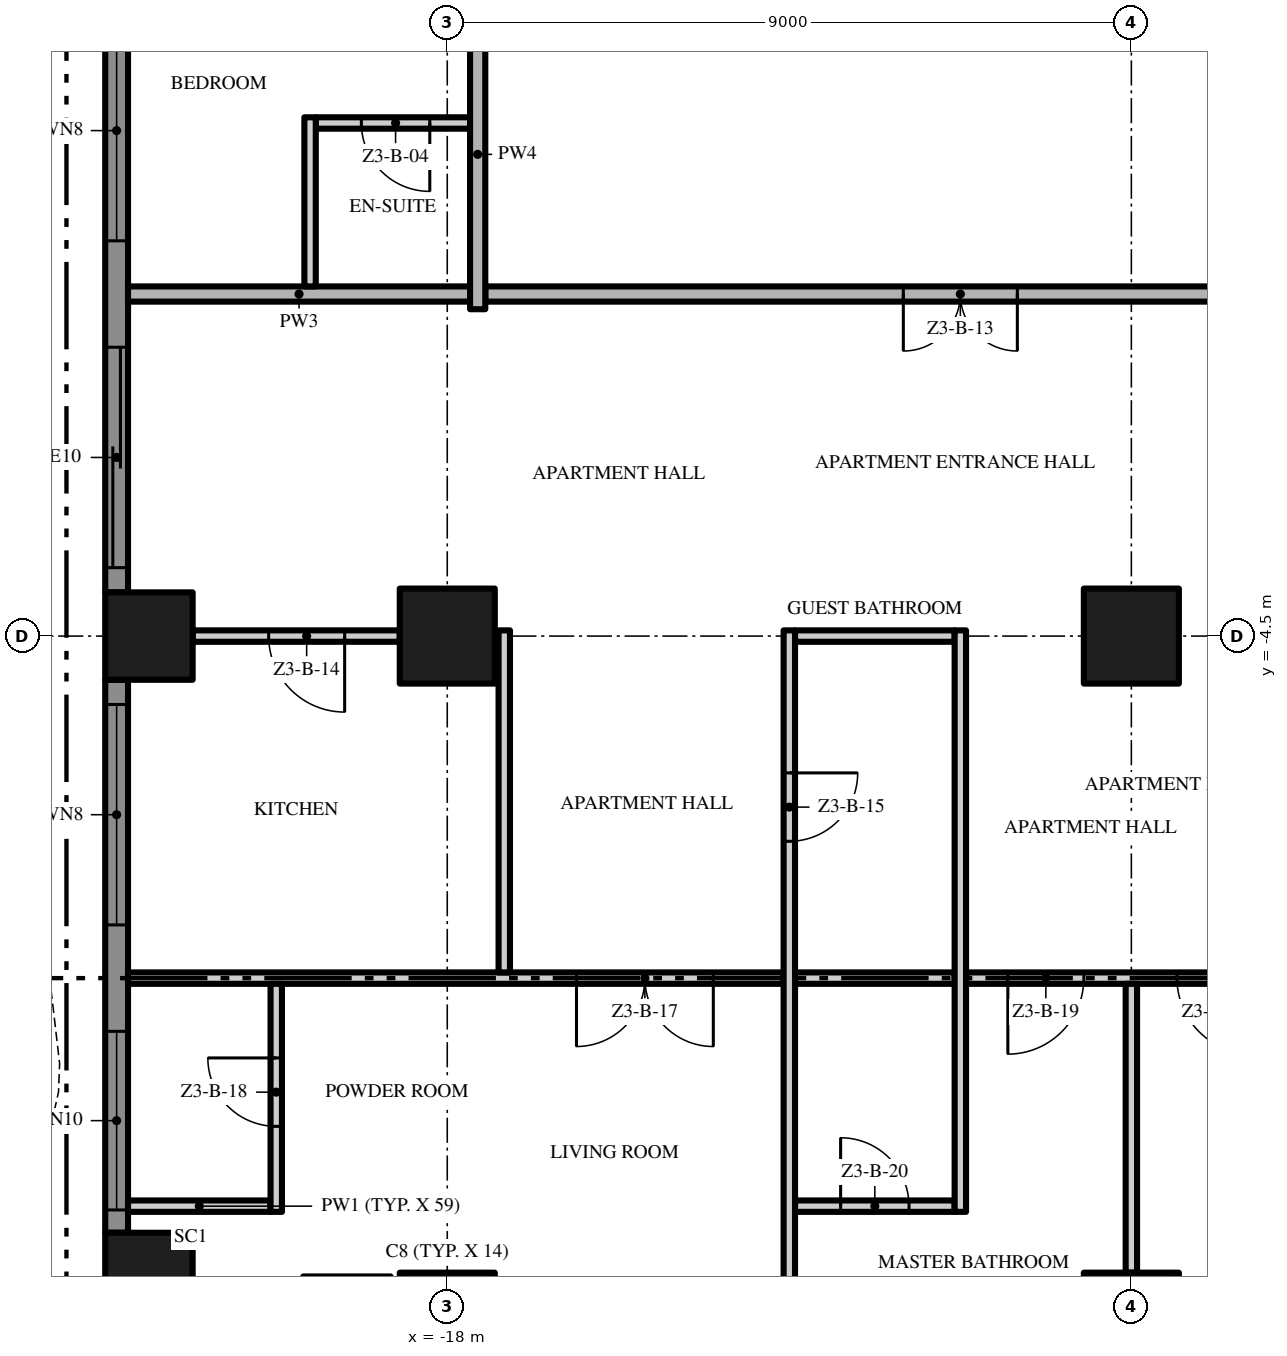
"""IFC4 building model, lengths in metres.
Left out: names, types, materials, properties, quantities, classifications, styles, units other than length and angle.
Written with IfcOpenShell. Run it as: python <this file> out.ifc"""

import sys

from ifc_helpers import new_model, si_unit, direction, frame, frame_2d, origin, origin_2d, place, context, subcontext, project, spatial, polyline, rectangle, outline, extrude, element, fill, save


model = new_model("IFC4")
c1 = context("Model", 3, precision=1e-05, world=origin(), true_north=direction((0.0, 1.0)))
c2 = subcontext(c1, "Body", "Model", "MODEL_VIEW")
j1 = project(units=[si_unit("LENGTHUNIT", "METRE"), si_unit("PLANEANGLEUNIT", "RADIAN")], contexts=[c1])
p1 = place(None, origin())
s1 = spatial("IfcSite", under=j1, at=p1, CompositionType="ELEMENT")
p2 = place(p1, origin())
s2 = spatial("IfcBuilding", under=s1, at=p2, CompositionType="ELEMENT")
p3 = place(p2, frame((0.0, 0.0, 140.2)))
s3 = spatial("IfcBuildingStorey", under=s2, at=p3, CompositionType="ELEMENT", Elevation=140.2)
for number, where, z_axis, x_axis in (
    (1, (-18.0, -13.5, 0.0), (0.0, 0.0, 1.0), (1.0, 0.0, 0.0)),
    (2, (-18.0, -4.5, 0.0), (0.0, 0.0, 1.0), (1.0, 0.0, 0.0)),
):
    element("IfcColumn", number, at=place(p3, frame(where, z_axis=z_axis, x_axis=x_axis)), inside=s3, PredefinedType="COLUMN", context=c2, shape_type="SweptSolid", body=[
        extrude(rectangle(XDim=1.25, YDim=1.25, at=origin_2d()), origin(), (0.0, 0.0, 1.0), 3.5),
    ])
for number, where, z_axis, x_axis in (
    (3, (-21.925, -12.925, 0.0), (0.0, 0.0, 1.0), (1.0, 0.0, 0.0)),
    (4, (-21.925, -4.5, 0.0), (0.0, 0.0, 1.0), (1.0, 0.0, 0.0)),
):
    element("IfcColumn", number, at=place(p3, frame(where, z_axis=z_axis, x_axis=x_axis)), inside=s3, PredefinedType="COLUMN", context=c2, shape_type="SweptSolid", body=[
        extrude(rectangle(XDim=1.15, YDim=1.15, at=origin_2d()), origin(), (0.0, 0.0, 1.0), 3.5),
    ])
for number, where, z_axis, x_axis in (
    (5, (-9.0, -13.5, 0.0), (0.0, 0.0, 1.0), (1.0, 0.0, 0.0)),
    (6, (-9.0, -4.5, 0.0), (0.0, 0.0, 1.0), (1.0, 0.0, 0.0)),
):
    element("IfcColumn", number, at=place(p3, frame(where, z_axis=z_axis, x_axis=x_axis)), inside=s3, PredefinedType="COLUMN", context=c2, shape_type="SweptSolid", body=[
        extrude(rectangle(XDim=1.25, YDim=1.25, at=origin_2d()), origin(), (0.0, 0.0, 1.0), 3.5),
    ])
p4 = place(p3, frame((-22.35, -3.925, 0.0), z_axis=(0.0, 0.0, 1.0), x_axis=(0.0, 1.0, 0.0)))
e7 = element("IfcWall", 7, at=p4, inside=s3, PredefinedType="SOLIDWALL", context=c2, shape_type="SweptSolid", body=[
    extrude(rectangle(XDim=7.85, YDim=0.3, at=frame_2d((3.925, 0.0))), origin(), (0.0, 0.0, 1.0), 3.5),
])
p5 = place(p4, frame((4.625, 0.0, 0.45)))
e8 = element("IfcOpeningElement", 8, at=p5, cuts=e7, PredefinedType="OPENING", context=c2, shape_type="SweptSolid", body=[
    extrude(rectangle(XDim=2.9, YDim=2.65, at=frame_2d((1.45, 1.325))), frame((0.0, 0.16, 0.0), z_axis=(0.0, -1.0, 0.0), x_axis=(1.0, 0.0, 0.0)), (0.0, 0.0, 1.0), 0.32),
])
p6 = place(p4, frame((0.325, 0.0, 0.0)))
e9 = element("IfcOpeningElement", 9, at=p6, cuts=e7, PredefinedType="OPENING", context=c2, shape_type="SweptSolid", body=[
    extrude(rectangle(XDim=2.9, YDim=2.4, at=frame_2d((1.45, 1.2))), frame((0.0, 0.16, 0.0), z_axis=(0.0, -1.0, 0.0), x_axis=(1.0, 0.0, 0.0)), (0.0, 0.0, 1.0), 0.32),
])
p7 = place(p3, frame((-22.35, -12.35, 0.0), z_axis=(0.0, 0.0, 1.0), x_axis=(0.0, 1.0, 0.0)))
e10 = element("IfcWall", 10, at=p7, inside=s3, PredefinedType="SOLIDWALL", context=c2, shape_type="SweptSolid", body=[
    extrude(rectangle(XDim=7.275, YDim=0.3, at=frame_2d((3.638, 0.0))), origin(), (0.0, 0.0, 1.0), 3.5),
])
p8 = place(p7, frame((4.05, 0.0, 0.45)))
e11 = element("IfcOpeningElement", 11, at=p8, cuts=e10, PredefinedType="OPENING", context=c2, shape_type="SweptSolid", body=[
    extrude(rectangle(XDim=2.9, YDim=2.65, at=frame_2d((1.45, 1.325))), frame((0.0, 0.16, 0.0), z_axis=(0.0, -1.0, 0.0), x_axis=(1.0, 0.0, 0.0)), (0.0, 0.0, 1.0), 0.32),
])
p9 = place(p7, frame((0.3, 0.0, 0.45)))
e12 = element("IfcOpeningElement", 12, at=p9, cuts=e10, PredefinedType="OPENING", context=c2, shape_type="SweptSolid", body=[
    extrude(rectangle(XDim=2.35, YDim=2.65, at=frame_2d((1.175, 1.325))), frame((0.0, 0.16, 0.0), z_axis=(0.0, -1.0, 0.0), x_axis=(1.0, 0.0, 0.0)), (0.0, 0.0, 1.0), 0.32),
])
p10 = place(p3, origin())
e13 = element("IfcWall", 13, at=p10, inside=s3, PredefinedType="USERDEFINED", context=c2, shape_type="SweptSolid", body=[
    extrude(outline(polyline([(-23.451, 18.0), (-24.112, 16.5), (-24.845, 15.0), (-25.369, 13.5), (-25.5, 12.375), (-25.485, 12.0), (-25.149, 10.5), (-24.488, 9.0), (-23.755, 7.5), (-23.231, 6.0), (-23.1, 4.875), (-23.115, 4.5), (-23.451, 3.0), (-24.112, 1.5), (-24.845, 0.0), (-25.369, -1.5), (-25.5, -2.625), (-25.485, -3.0), (-25.149, -4.5), (-24.488, -6.0), (-23.755, -7.5), (-23.231, -9.0), (-23.1, -10.125), (-23.115, -10.5), (-23.451, -12.0), (-24.112, -13.5), (-23.883, -13.601), (-23.213, -12.079), (-22.866, -10.533), (-22.849, -10.115), (-22.986, -8.944), (-23.524, -7.404), (-24.261, -5.895), (-24.91, -4.421), (-25.236, -2.967), (-25.249, -2.635), (-25.124, -1.556), (-24.614, -0.096), (-23.885, 1.395), (-23.213, 2.921), (-22.866, 4.467), (-22.849, 4.885), (-22.986, 6.056), (-23.524, 7.596), (-24.261, 9.105), (-24.91, 10.579), (-25.236, 12.033), (-25.249, 12.365), (-25.124, 13.444), (-24.614, 14.904), (-23.885, 16.395), (-23.223, 17.899), (-23.451, 18.0)])), origin(), (0.0, 0.0, 1.0), 0.9),
])
p11 = place(p3, frame((-22.2, -12.0, 0.0), z_axis=(0.0, 0.0, 1.0), x_axis=(1.0, 0.0, 0.0)))
e14 = element("IfcWall", 14, at=p11, inside=s3, PredefinedType="PARTITIONING", context=c2, shape_type="SweptSolid", body=[
    extrude(rectangle(XDim=1.875, YDim=0.15, at=frame_2d((0.938, 0.0))), origin(), (0.0, 0.0, 1.0), 3.5),
])
p12 = place(p3, frame((-13.425, -12.0, 0.0), z_axis=(0.0, 0.0, 1.0), x_axis=(1.0, 0.0, 0.0)))
e15 = element("IfcWall", 15, at=p12, inside=s3, PredefinedType="PARTITIONING", context=c2, shape_type="SweptSolid", body=[
    extrude(rectangle(XDim=2.1, YDim=0.15, at=frame_2d((1.05, 0.0))), origin(), (0.0, 0.0, 1.0), 3.5),
])
p13 = place(p12, frame((0.6, 0.0, 0.0)))
e16 = element("IfcOpeningElement", 16, at=p13, cuts=e15, PredefinedType="OPENING", context=c2, shape_type="SweptSolid", body=[
    extrude(rectangle(XDim=0.9, YDim=2.1, at=frame_2d((0.45, 1.05))), frame((0.0, 0.085, 0.0), z_axis=(0.0, -1.0, 0.0), x_axis=(1.0, 0.0, 0.0)), (0.0, 0.0, 1.0), 0.17),
])
p14 = place(p3, frame((-13.575, -9.0, 0.0), z_axis=(0.0, 0.0, 1.0), x_axis=(-1.0, 0.0, 0.0)))
e17 = element("IfcWall", 17, at=p14, inside=s3, PredefinedType="PARTITIONING", context=c2, shape_type="SweptSolid", body=[
    extrude(rectangle(XDim=8.625, YDim=0.15, at=frame_2d((4.312, 0.0))), origin(), (0.0, 0.0, 1.0), 3.5),
])
p15 = place(p14, frame((0.925, 0.0, 0.0)))
e18 = element("IfcOpeningElement", 18, at=p15, cuts=e17, PredefinedType="OPENING", context=c2, shape_type="SweptSolid", body=[
    extrude(rectangle(XDim=1.8, YDim=2.4, at=frame_2d((0.9, 1.2))), frame((0.0, 0.085, 0.0), z_axis=(0.0, -1.0, 0.0), x_axis=(1.0, 0.0, 0.0)), (0.0, 0.0, 1.0), 0.17),
])
p16 = place(p3, frame((-13.425, -9.0, 0.0), z_axis=(0.0, 0.0, 1.0), x_axis=(1.0, 0.0, 0.0)))
e19 = element("IfcWall", 19, at=p16, inside=s3, PredefinedType="PARTITIONING", context=c2, shape_type="SweptSolid", body=[
    extrude(rectangle(XDim=2.1, YDim=0.15, at=frame_2d((1.05, 0.0))), origin(), (0.0, 0.0, 1.0), 3.5),
])
p17 = place(p3, frame((-6.825, -9.0, 0.0), z_axis=(0.0, 0.0, 1.0), x_axis=(-1.0, 0.0, 0.0)))
e20 = element("IfcWall", 20, at=p17, inside=s3, PredefinedType="PARTITIONING", context=c2, shape_type="SweptSolid", body=[
    extrude(rectangle(XDim=4.35, YDim=0.15, at=frame_2d((2.175, 0.0))), origin(), (0.0, 0.0, 1.0), 3.5),
])
p18 = place(p17, frame((2.8, 0.0, 0.0)))
e21 = element("IfcOpeningElement", 21, at=p18, cuts=e20, PredefinedType="OPENING", context=c2, shape_type="SweptSolid", body=[
    extrude(rectangle(XDim=1.0, YDim=2.4, at=frame_2d((0.5, 1.2))), frame((0.0, 0.085, 0.0), z_axis=(0.0, -1.0, 0.0), x_axis=(1.0, 0.0, 0.0)), (0.0, 0.0, 1.0), 0.17),
])
p19 = place(p17, frame((0.575, 0.0, 0.0)))
e22 = element("IfcOpeningElement", 22, at=p19, cuts=e20, PredefinedType="OPENING", context=c2, shape_type="SweptSolid", body=[
    extrude(rectangle(XDim=1.0, YDim=2.4, at=frame_2d((0.5, 1.2))), frame((0.0, 0.085, 0.0), z_axis=(0.0, -1.0, 0.0), x_axis=(1.0, 0.0, 0.0)), (0.0, 0.0, 1.0), 0.17),
])
p20 = place(p3, frame((-18.625, -4.5, 0.0), z_axis=(0.0, 0.0, 1.0), x_axis=(-1.0, 0.0, 0.0)))
e23 = element("IfcWall", 23, at=p20, inside=s3, PredefinedType="PARTITIONING", context=c2, shape_type="SweptSolid", body=[
    extrude(rectangle(XDim=2.725, YDim=0.15, at=frame_2d((1.363, 0.0))), origin(), (0.0, 0.0, 1.0), 3.5),
])
p21 = place(p20, frame((0.725, 0.0, 0.0)))
e24 = element("IfcOpeningElement", 24, at=p21, cuts=e23, PredefinedType="OPENING", context=c2, shape_type="SweptSolid", body=[
    extrude(rectangle(XDim=1.0, YDim=2.4, at=frame_2d((0.5, 1.2))), frame((0.0, 0.085, 0.0), z_axis=(0.0, -1.0, 0.0), x_axis=(1.0, 0.0, 0.0)), (0.0, 0.0, 1.0), 0.17),
])
p22 = place(p3, frame((-13.425, -4.5, 0.0), z_axis=(0.0, 0.0, 1.0), x_axis=(1.0, 0.0, 0.0)))
e25 = element("IfcWall", 25, at=p22, inside=s3, PredefinedType="PARTITIONING", context=c2, shape_type="SweptSolid", body=[
    extrude(rectangle(XDim=2.1, YDim=0.15, at=frame_2d((1.05, 0.0))), origin(), (0.0, 0.0, 1.0), 3.5),
])
p23 = place(p3, frame((17.5, 0.0, 0.0), z_axis=(0.0, 0.0, 1.0), x_axis=(-1.0, 0.0, 0.0)))
e26 = element("IfcWall", 26, at=p23, inside=s3, PredefinedType="PARTITIONING", context=c2, shape_type="SweptSolid", body=[
    extrude(rectangle(XDim=35.0, YDim=0.2, at=frame_2d((17.5, 0.0))), origin(), (0.0, 0.0, 1.0), 3.5),
])
p24 = place(p23, frame((28.0, 0.0, 0.0)))
e27 = element("IfcOpeningElement", 27, at=p24, cuts=e26, PredefinedType="OPENING", context=c2, shape_type="SweptSolid", body=[
    extrude(rectangle(XDim=1.5, YDim=2.4, at=frame_2d((0.75, 1.2))), frame((0.0, 0.11, 0.0), z_axis=(0.0, -1.0, 0.0), x_axis=(1.0, 0.0, 0.0)), (0.0, 0.0, 1.0), 0.22),
])
p25 = place(p23, frame((10.0, 0.0, 0.0)))
e28 = element("IfcOpeningElement", 28, at=p25, cuts=e26, PredefinedType="OPENING", context=c2, shape_type="SweptSolid", body=[
    extrude(rectangle(XDim=1.5, YDim=2.4, at=frame_2d((0.75, 1.2))), frame((0.0, 0.11, 0.0), z_axis=(0.0, -1.0, 0.0), x_axis=(1.0, 0.0, 0.0)), (0.0, 0.0, 1.0), 0.22),
])
p26 = place(p3, frame((-22.2, 0.0, 0.0), z_axis=(0.0, 0.0, 1.0), x_axis=(1.0, 0.0, 0.0)))
e29 = element("IfcWall", 29, at=p26, inside=s3, PredefinedType="PARTITIONING", context=c2, shape_type="SweptSolid", body=[
    extrude(rectangle(XDim=4.5, YDim=0.2, at=frame_2d((2.25, 0.0))), origin(), (0.0, 0.0, 1.0), 3.5),
])
p27 = place(p3, frame((-17.7, 2.25, 0.0), z_axis=(0.0, 0.0, 1.0), x_axis=(-1.0, 0.0, 0.0)))
e30 = element("IfcWall", 30, at=p27, inside=s3, PredefinedType="PARTITIONING", context=c2, shape_type="SweptSolid", body=[
    extrude(rectangle(XDim=2.03, YDim=0.15, at=frame_2d((1.015, 0.0))), origin(), (0.0, 0.0, 1.0), 3.5),
])
p28 = place(p27, frame((0.53, 0.0, 0.0)))
e31 = element("IfcOpeningElement", 31, at=p28, cuts=e30, PredefinedType="OPENING", context=c2, shape_type="SweptSolid", body=[
    extrude(rectangle(XDim=0.9, YDim=2.1, at=frame_2d((0.45, 1.05))), frame((0.0, 0.085, 0.0), z_axis=(0.0, -1.0, 0.0), x_axis=(1.0, 0.0, 0.0)), (0.0, 0.0, 1.0), 0.17),
])
p29 = place(p3, frame((-20.25, -12.075, 0.0), z_axis=(0.0, 0.0, 1.0), x_axis=(0.0, 1.0, 0.0)))
e32 = element("IfcWall", 32, at=p29, inside=s3, PredefinedType="PARTITIONING", context=c2, shape_type="SweptSolid", body=[
    extrude(rectangle(XDim=3.0, YDim=0.15, at=frame_2d((1.5, 0.0))), origin(), (0.0, 0.0, 1.0), 3.5),
])
p30 = place(p29, frame((1.125, 0.0, 0.0)))
e33 = element("IfcOpeningElement", 33, at=p30, cuts=e32, PredefinedType="OPENING", context=c2, shape_type="SweptSolid", body=[
    extrude(rectangle(XDim=0.9, YDim=2.1, at=frame_2d((0.45, 1.05))), frame((0.0, 0.085, 0.0), z_axis=(0.0, -1.0, 0.0), x_axis=(1.0, 0.0, 0.0)), (0.0, 0.0, 1.0), 0.17),
])
p31 = place(p3, frame((-19.805, 0.1, 0.0), z_axis=(0.0, 0.0, 1.0), x_axis=(0.0, 1.0, 0.0)))
e34 = element("IfcWall", 34, at=p31, inside=s3, PredefinedType="PARTITIONING", context=c2, shape_type="SweptSolid", body=[
    extrude(rectangle(XDim=2.225, YDim=0.15, at=frame_2d((1.113, 0.0))), origin(), (0.0, 0.0, 1.0), 3.5),
])
p32 = place(p3, frame((-17.6, -0.2, 0.0), z_axis=(0.0, 0.0, 1.0), x_axis=(0.0, 1.0, 0.0)))
e35 = element("IfcWall", 35, at=p32, inside=s3, PredefinedType="PARTITIONING", context=c2, shape_type="SweptSolid", body=[
    extrude(rectangle(XDim=4.075, YDim=0.2, at=frame_2d((2.038, 0.0))), origin(), (0.0, 0.0, 1.0), 3.5),
])
p33 = place(p3, frame((-17.25, -8.925, 0.0), z_axis=(0.0, 0.0, 1.0), x_axis=(0.0, 1.0, 0.0)))
e36 = element("IfcWall", 36, at=p33, inside=s3, PredefinedType="PARTITIONING", context=c2, shape_type="SweptSolid", body=[
    extrude(rectangle(XDim=4.5, YDim=0.15, at=frame_2d((2.25, 0.0))), origin(), (0.0, 0.0, 1.0), 3.5),
])
p34 = place(p3, frame((-13.5, -4.425, 0.0), z_axis=(0.0, 0.0, 1.0), x_axis=(0.0, -1.0, 0.0)))
e37 = element("IfcWall", 37, at=p34, inside=s3, PredefinedType="PARTITIONING", context=c2, shape_type="SweptSolid", body=[
    extrude(rectangle(XDim=13.275, YDim=0.15, at=frame_2d((6.638, 0.0))), origin(), (0.0, 0.0, 1.0), 3.5),
])
p35 = place(p34, frame((1.875, 0.0, 0.0)))
e38 = element("IfcOpeningElement", 38, at=p35, cuts=e37, PredefinedType="OPENING", context=c2, shape_type="SweptSolid", body=[
    extrude(rectangle(XDim=0.9, YDim=2.1, at=frame_2d((0.45, 1.05))), frame((0.0, 0.085, 0.0), z_axis=(0.0, -1.0, 0.0), x_axis=(1.0, 0.0, 0.0)), (0.0, 0.0, 1.0), 0.17),
])
p36 = place(p3, frame((-11.25, -12.075, 0.0), z_axis=(0.0, 0.0, 1.0), x_axis=(0.0, 1.0, 0.0)))
e39 = element("IfcWall", 39, at=p36, inside=s3, PredefinedType="PARTITIONING", context=c2, shape_type="SweptSolid", body=[
    extrude(rectangle(XDim=7.65, YDim=0.15, at=frame_2d((3.825, 0.0))), origin(), (0.0, 0.0, 1.0), 3.5),
])
p37 = place(p3, frame((-9.0, -12.875, 0.0), z_axis=(0.0, 0.0, 1.0), x_axis=(0.0, 1.0, 0.0)))
e40 = element("IfcWall", 40, at=p37, inside=s3, PredefinedType="PARTITIONING", context=c2, shape_type="SweptSolid", body=[
    extrude(rectangle(XDim=3.8, YDim=0.15, at=frame_2d((1.9, 0.0))), origin(), (0.0, 0.0, 1.0), 3.5),
])
p38 = place(p5, origin())
e41 = element("IfcWindow", 41, at=p38, inside=s3, PartitioningType="SINGLE_PANEL", PredefinedType="WINDOW", context=c2, shape_type="SweptSolid", body=[
    extrude(rectangle(XDim=2.9, YDim=2.65, at=frame_2d((1.45, 1.325))), frame((0.0, 0.03, 0.0), z_axis=(0.0, -1.0, 0.0), x_axis=(1.0, 0.0, 0.0)), (0.0, 0.0, 1.0), 0.06),
])
fill(e8, e41)
p39 = place(p6, origin())
e42 = element("IfcDoor", 42, at=p39, inside=s3, OperationType="SINGLE_SWING_LEFT", PredefinedType="DOOR", context=c2, shape_type="SweptSolid", body=[
    extrude(rectangle(XDim=2.9, YDim=2.4, at=frame_2d((1.45, 1.2))), frame((0.0, 0.025, 0.0), z_axis=(0.0, -1.0, 0.0), x_axis=(1.0, 0.0, 0.0)), (0.0, 0.0, 1.0), 0.05),
])
fill(e9, e42)
p40 = place(p8, origin())
e43 = element("IfcWindow", 43, at=p40, inside=s3, PartitioningType="SINGLE_PANEL", PredefinedType="WINDOW", context=c2, shape_type="SweptSolid", body=[
    extrude(rectangle(XDim=2.9, YDim=2.65, at=frame_2d((1.45, 1.325))), frame((0.0, 0.03, 0.0), z_axis=(0.0, -1.0, 0.0), x_axis=(1.0, 0.0, 0.0)), (0.0, 0.0, 1.0), 0.06),
])
fill(e11, e43)
p41 = place(p9, origin())
e44 = element("IfcWindow", 44, at=p41, inside=s3, PartitioningType="SINGLE_PANEL", PredefinedType="WINDOW", context=c2, shape_type="SweptSolid", body=[
    extrude(rectangle(XDim=2.35, YDim=2.65, at=frame_2d((1.175, 1.325))), frame((0.0, 0.03, 0.0), z_axis=(0.0, -1.0, 0.0), x_axis=(1.0, 0.0, 0.0)), (0.0, 0.0, 1.0), 0.06),
])
fill(e12, e44)
p42 = place(p28, origin())
e45 = element("IfcDoor", 45, at=p42, inside=s3, OperationType="SINGLE_SWING_LEFT", PredefinedType="DOOR", context=c2, shape_type="SweptSolid", body=[
    extrude(rectangle(XDim=0.9, YDim=2.1, at=frame_2d((0.45, 1.05))), frame((0.0, 0.025, 0.0), z_axis=(0.0, -1.0, 0.0), x_axis=(1.0, 0.0, 0.0)), (0.0, 0.0, 1.0), 0.05),
])
fill(e31, e45)
p43 = place(p24, origin())
e46 = element("IfcDoor", 46, at=p43, inside=s3, OperationType="DOUBLE_DOOR_SINGLE_SWING", PredefinedType="DOOR", context=c2, shape_type="SweptSolid", body=[
    extrude(rectangle(XDim=1.5, YDim=2.4, at=frame_2d((0.75, 1.2))), frame((0.0, 0.025, 0.0), z_axis=(0.0, -1.0, 0.0), x_axis=(1.0, 0.0, 0.0)), (0.0, 0.0, 1.0), 0.05),
])
fill(e27, e46)
p44 = place(p21, origin())
e47 = element("IfcDoor", 47, at=p44, inside=s3, OperationType="SINGLE_SWING_LEFT", PredefinedType="DOOR", context=c2, shape_type="SweptSolid", body=[
    extrude(rectangle(XDim=1.0, YDim=2.4, at=frame_2d((0.5, 1.2))), frame((0.0, 0.025, 0.0), z_axis=(0.0, -1.0, 0.0), x_axis=(1.0, 0.0, 0.0)), (0.0, 0.0, 1.0), 0.05),
])
fill(e24, e47)
p45 = place(p35, origin())
e48 = element("IfcDoor", 48, at=p45, inside=s3, OperationType="SINGLE_SWING_LEFT", PredefinedType="DOOR", context=c2, shape_type="SweptSolid", body=[
    extrude(rectangle(XDim=0.9, YDim=2.1, at=frame_2d((0.45, 1.05))), frame((0.0, 0.025, 0.0), z_axis=(0.0, -1.0, 0.0), x_axis=(1.0, 0.0, 0.0)), (0.0, 0.0, 1.0), 0.05),
])
fill(e38, e48)
p46 = place(p15, origin())
e49 = element("IfcDoor", 49, at=p46, inside=s3, OperationType="DOUBLE_DOOR_SINGLE_SWING", PredefinedType="DOOR", context=c2, shape_type="SweptSolid", body=[
    extrude(rectangle(XDim=1.8, YDim=2.4, at=frame_2d((0.9, 1.2))), frame((0.0, 0.025, 0.0), z_axis=(0.0, -1.0, 0.0), x_axis=(1.0, 0.0, 0.0)), (0.0, 0.0, 1.0), 0.05),
])
fill(e18, e49)
p47 = place(p30, origin())
e50 = element("IfcDoor", 50, at=p47, inside=s3, OperationType="SINGLE_SWING_RIGHT", PredefinedType="DOOR", context=c2, shape_type="SweptSolid", body=[
    extrude(rectangle(XDim=0.9, YDim=2.1, at=frame_2d((0.45, 1.05))), frame((0.0, 0.025, 0.0), z_axis=(0.0, -1.0, 0.0), x_axis=(1.0, 0.0, 0.0)), (0.0, 0.0, 1.0), 0.05),
])
fill(e33, e50)
p48 = place(p18, origin())
e51 = element("IfcDoor", 51, at=p48, inside=s3, OperationType="SINGLE_SWING_RIGHT", PredefinedType="DOOR", context=c2, shape_type="SweptSolid", body=[
    extrude(rectangle(XDim=1.0, YDim=2.4, at=frame_2d((0.5, 1.2))), frame((0.0, 0.025, 0.0), z_axis=(0.0, -1.0, 0.0), x_axis=(1.0, 0.0, 0.0)), (0.0, 0.0, 1.0), 0.05),
])
fill(e21, e51)
p49 = place(p13, origin())
e52 = element("IfcDoor", 52, at=p49, inside=s3, OperationType="SINGLE_SWING_LEFT", PredefinedType="DOOR", context=c2, shape_type="SweptSolid", body=[
    extrude(rectangle(XDim=0.9, YDim=2.1, at=frame_2d((0.45, 1.05))), frame((0.0, 0.025, 0.0), z_axis=(0.0, -1.0, 0.0), x_axis=(1.0, 0.0, 0.0)), (0.0, 0.0, 1.0), 0.05),
])
fill(e16, e52)
p50 = place(p19, origin())
e53 = element("IfcDoor", 53, at=p50, inside=s3, OperationType="SINGLE_SWING_LEFT", PredefinedType="DOOR", context=c2, shape_type="SweptSolid", body=[
    extrude(rectangle(XDim=1.0, YDim=2.4, at=frame_2d((0.5, 1.2))), frame((0.0, 0.025, 0.0), z_axis=(0.0, -1.0, 0.0), x_axis=(1.0, 0.0, 0.0)), (0.0, 0.0, 1.0), 0.05),
])
fill(e22, e53)
save(model, sys.argv[1])
